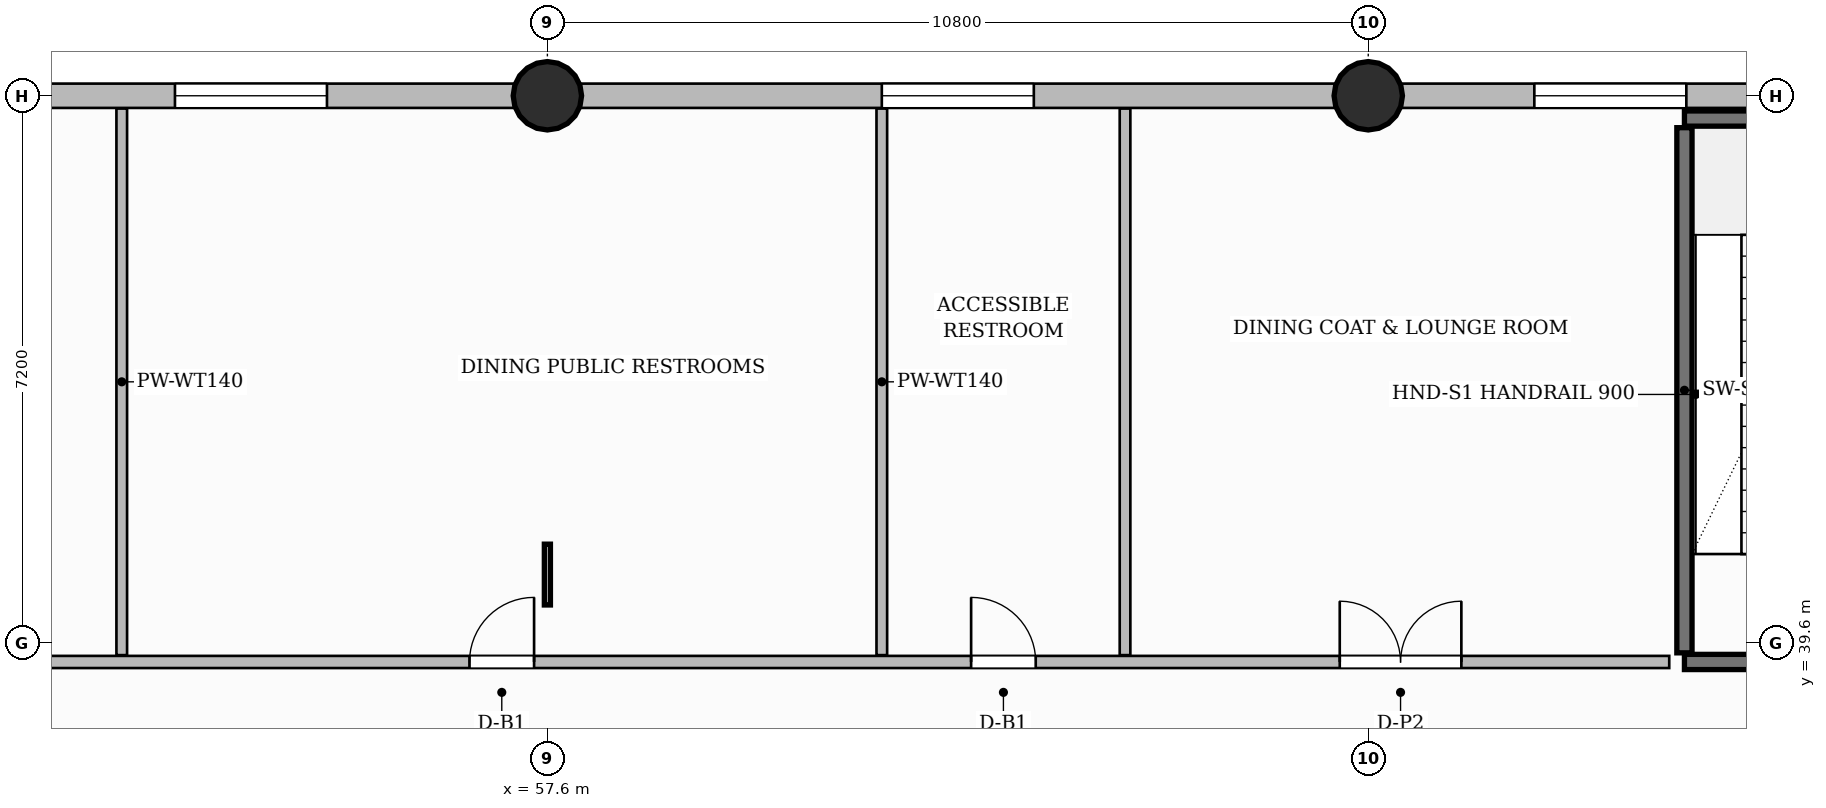
"""IFC4 building model, lengths in metres.
Left out: names, types, materials, properties, quantities, classifications, styles, units other than length and angle.
Written with IfcOpenShell. Run it as: python <this file> out.ifc"""

import sys

from ifc_helpers import new_model, si_unit, direction, frame, frame_2d, origin, origin_2d, place, context, subcontext, project, spatial, rectangle, circle, extrude, source, transform, mapped, element, fill, save


model = new_model("IFC4")
c1 = context("Model", 3, precision=1e-05, world=origin(), true_north=direction((0.0, 1.0)))
c2 = subcontext(c1, "Body", "Model", "MODEL_VIEW")
j1 = project(units=[si_unit("LENGTHUNIT", "METRE"), si_unit("PLANEANGLEUNIT", "RADIAN")], contexts=[c1])
p1 = place(None, origin())
s1 = spatial("IfcSite", under=j1, at=p1, CompositionType="ELEMENT")
p2 = place(p1, origin())
s2 = spatial("IfcBuilding", under=s1, at=p2, CompositionType="ELEMENT")
p3 = place(p2, frame((0.0, 0.0, 10.8)))
s3 = spatial("IfcBuildingStorey", under=s2, at=p3, CompositionType="ELEMENT", Elevation=10.8)
m1 = source(origin(), c2, "Body", "SweptSolid", [
    extrude(circle(Radius=0.45, at=origin_2d()), origin(), (0.0, 0.0, 1.0), 5.4),
])
for number, where, z_axis, x_axis in (
    (1, (57.6, 46.8, 0.0), (0.0, 0.0, 1.0), (1.0, 0.0, 0.0)),
    (2, (68.4, 46.8, 0.0), (0.0, 0.0, 1.0), (1.0, 0.0, 0.0)),
):
    element("IfcColumn", number, at=place(p3, frame(where, z_axis=z_axis, x_axis=x_axis)), inside=s3, PredefinedType="COLUMN", context=c2, shape_type="MappedRepresentation", body=[
        mapped(m1, transform((0.0, 0.0, 0.0), scale=1.0)),
    ])
p4 = place(p3, frame((72.56, 39.47, 0.0), z_axis=(0.0, 0.0, 1.0), x_axis=(0.0, 1.0, 0.0)))
e3 = element("IfcWall", 3, at=p4, inside=s3, PredefinedType="SHEAR", context=c2, shape_type="SweptSolid", body=[
    extrude(rectangle(XDim=6.91, YDim=0.2, at=frame_2d((3.455, 0.0))), origin(), (0.0, 0.0, 1.0), 5.4),
])
p5 = place(p3, frame((72.56, 46.5, 0.0), z_axis=(0.0, 0.0, 1.0), x_axis=(1.0, 0.0, 0.0)))
e4 = element("IfcWall", 4, at=p5, inside=s3, PredefinedType="SHEAR", context=c2, shape_type="SweptSolid", body=[
    extrude(rectangle(XDim=2.94, YDim=0.2, at=frame_2d((1.47, 0.0))), origin(), (0.0, 0.0, 1.0), 5.4),
])
p6 = place(p3, frame((72.56, 39.35, 0.0), z_axis=(0.0, 0.0, 1.0), x_axis=(1.0, 0.0, 0.0)))
e5 = element("IfcWall", 5, at=p6, inside=s3, PredefinedType="SHEAR", context=c2, shape_type="SweptSolid", body=[
    extrude(rectangle(XDim=2.94, YDim=0.2, at=frame_2d((1.47, 0.0))), origin(), (0.0, 0.0, 1.0), 5.4),
])
p7 = place(p6, frame((0.985, 0.0, 0.0)))
e6 = element("IfcOpeningElement", 6, at=p7, cuts=e5, PredefinedType="OPENING", context=c2, shape_type="SweptSolid", body=[
    extrude(rectangle(XDim=1.05, YDim=2.2, at=frame_2d((0.525, 1.1))), frame((0.0, 0.11, 0.0), z_axis=(0.0, -1.0, 0.0), x_axis=(1.0, 0.0, 0.0)), (0.0, 0.0, 1.0), 0.22),
])
p8 = place(p3, frame((28.64, 39.35, 0.0), z_axis=(0.0, 0.0, 1.0), x_axis=(1.0, 0.0, 0.0)))
e7 = element("IfcWall", 7, at=p8, inside=s3, PredefinedType="PARTITIONING", context=c2, shape_type="SweptSolid", body=[
    extrude(rectangle(XDim=43.72, YDim=0.16, at=frame_2d((21.86, 0.0))), origin(), (0.0, 0.0, 1.0), 4.185),
])
p9 = place(p8, frame((10.835, 0.0, 0.0)))
e8 = element("IfcOpeningElement", 8, at=p9, cuts=e7, PredefinedType="OPENING", context=c2, shape_type="SweptSolid", body=[
    extrude(rectangle(XDim=1.6, YDim=2.4, at=frame_2d((0.8, 1.2))), frame((0.0, 0.09, 0.0), z_axis=(0.0, -1.0, 0.0), x_axis=(1.0, 0.0, 0.0)), (0.0, 0.0, 1.0), 0.18),
])
p10 = place(p8, frame((27.935, 0.0, 0.0)))
e9 = element("IfcOpeningElement", 9, at=p10, cuts=e7, PredefinedType="OPENING", context=c2, shape_type="SweptSolid", body=[
    extrude(rectangle(XDim=0.85, YDim=2.1, at=frame_2d((0.425, 1.05))), frame((0.0, 0.09, 0.0), z_axis=(0.0, -1.0, 0.0), x_axis=(1.0, 0.0, 0.0)), (0.0, 0.0, 1.0), 0.18),
])
p11 = place(p8, frame((34.535, 0.0, 0.0)))
e10 = element("IfcOpeningElement", 10, at=p11, cuts=e7, PredefinedType="OPENING", context=c2, shape_type="SweptSolid", body=[
    extrude(rectangle(XDim=0.85, YDim=2.1, at=frame_2d((0.425, 1.05))), frame((0.0, 0.09, 0.0), z_axis=(0.0, -1.0, 0.0), x_axis=(1.0, 0.0, 0.0)), (0.0, 0.0, 1.0), 0.18),
])
p12 = place(p8, frame((39.385, 0.0, 0.0)))
e11 = element("IfcOpeningElement", 11, at=p12, cuts=e7, PredefinedType="OPENING", context=c2, shape_type="SweptSolid", body=[
    extrude(rectangle(XDim=1.6, YDim=2.4, at=frame_2d((0.8, 1.2))), frame((0.0, 0.09, 0.0), z_axis=(0.0, -1.0, 0.0), x_axis=(1.0, 0.0, 0.0)), (0.0, 0.0, 1.0), 0.18),
])
for number, where, z_axis, x_axis in (
    (12, (52.0, 39.44, 0.0), (0.0, 0.0, 1.0), (0.0, 1.0, 0.0)),
    (13, (62.0, 39.44, 0.0), (0.0, 0.0, 1.0), (0.0, 1.0, 0.0)),
    (14, (65.2, 39.44, 0.0), (0.0, 0.0, 1.0), (0.0, 1.0, 0.0)),
):
    element("IfcWall", number, at=place(p3, frame(where, z_axis=z_axis, x_axis=x_axis)), inside=s3, PredefinedType="PARTITIONING", context=c2, shape_type="SweptSolid", body=[
        extrude(rectangle(XDim=7.192, YDim=0.14, at=frame_2d((3.596, 0.0))), origin(), (0.0, 0.0, 1.0), 5.1),
    ])
p13 = place(p3, frame((49.8, 46.8, 0.0), z_axis=(0.0, 0.0, 1.0), x_axis=(1.0, 0.0, 0.0)))
e15 = element("IfcWall", 15, at=p13, inside=s3, PredefinedType="SOLIDWALL", context=c2, shape_type="SweptSolid", body=[
    extrude(rectangle(XDim=30.6, YDim=0.32, at=frame_2d((15.3, 0.0))), origin(), (0.0, 0.0, 1.0), 4.185),
])
p14 = place(p13, frame((2.9, 0.0, 0.75)))
e16 = element("IfcOpeningElement", 16, at=p14, cuts=e15, PredefinedType="OPENING", context=c2, shape_type="SweptSolid", body=[
    extrude(rectangle(XDim=2.0, YDim=2.6, at=frame_2d((1.0, 1.3))), frame((0.0, 0.17, 0.0), z_axis=(0.0, -1.0, 0.0), x_axis=(1.0, 0.0, 0.0)), (0.0, 0.0, 1.0), 0.34),
])
p15 = place(p13, frame((12.2, 0.0, 0.75)))
e17 = element("IfcOpeningElement", 17, at=p15, cuts=e15, PredefinedType="OPENING", context=c2, shape_type="SweptSolid", body=[
    extrude(rectangle(XDim=2.0, YDim=2.6, at=frame_2d((1.0, 1.3))), frame((0.0, 0.17, 0.0), z_axis=(0.0, -1.0, 0.0), x_axis=(1.0, 0.0, 0.0)), (0.0, 0.0, 1.0), 0.34),
])
p16 = place(p13, frame((20.785, 0.0, 0.75)))
e18 = element("IfcOpeningElement", 18, at=p16, cuts=e15, PredefinedType="OPENING", context=c2, shape_type="SweptSolid", body=[
    extrude(rectangle(XDim=2.0, YDim=2.6, at=frame_2d((1.0, 1.3))), frame((0.0, 0.17, 0.0), z_axis=(0.0, -1.0, 0.0), x_axis=(1.0, 0.0, 0.0)), (0.0, 0.0, 1.0), 0.34),
])
p17 = place(p13, frame((25.445, 0.0, 0.75)))
e19 = element("IfcOpeningElement", 19, at=p17, cuts=e15, PredefinedType="OPENING", context=c2, shape_type="SweptSolid", body=[
    extrude(rectangle(XDim=2.0, YDim=2.6, at=frame_2d((1.0, 1.3))), frame((0.0, 0.17, 0.0), z_axis=(0.0, -1.0, 0.0), x_axis=(1.0, 0.0, 0.0)), (0.0, 0.0, 1.0), 0.34),
])
m2 = source(origin(), c2, "Body", "SweptSolid", [
    extrude(rectangle(XDim=0.85, YDim=2.1, at=frame_2d((0.425, 1.05))), frame((0.0, 0.025, 0.0), z_axis=(0.0, -1.0, 0.0), x_axis=(1.0, 0.0, 0.0)), (0.0, 0.0, 1.0), 0.05),
])
p18 = place(p10, origin())
e20 = element("IfcDoor", 20, at=p18, inside=s3, OperationType="SINGLE_SWING_RIGHT", PredefinedType="DOOR", context=c2, shape_type="MappedRepresentation", body=[
    mapped(m2, transform((0.0, 0.0, 0.0), scale=1.0)),
])
fill(e9, e20)
p19 = place(p11, origin())
e21 = element("IfcDoor", 21, at=p19, inside=s3, OperationType="SINGLE_SWING_LEFT", PredefinedType="DOOR", context=c2, shape_type="MappedRepresentation", body=[
    mapped(m2, transform((0.0, 0.0, 0.0), scale=1.0)),
])
fill(e10, e21)
m3 = source(origin(), c2, "Body", "SweptSolid", [
    extrude(rectangle(XDim=1.6, YDim=2.4, at=frame_2d((0.8, 1.2))), frame((0.0, 0.025, 0.0), z_axis=(0.0, -1.0, 0.0), x_axis=(1.0, 0.0, 0.0)), (0.0, 0.0, 1.0), 0.05),
])
p20 = place(p12, origin())
e22 = element("IfcDoor", 22, at=p20, inside=s3, OperationType="DOUBLE_DOOR_SINGLE_SWING", PredefinedType="DOOR", context=c2, shape_type="MappedRepresentation", body=[
    mapped(m3, transform((0.0, 0.0, 0.0), scale=1.0)),
])
fill(e11, e22)
m4 = source(origin(), c2, "Body", "SweptSolid", [
    extrude(rectangle(XDim=2.0, YDim=2.6, at=frame_2d((1.0, 1.3))), frame((0.0, 0.03, 0.0), z_axis=(0.0, -1.0, 0.0), x_axis=(1.0, 0.0, 0.0)), (0.0, 0.0, 1.0), 0.06),
])
p21 = place(p14, origin())
e23 = element("IfcWindow", 23, at=p21, inside=s3, PartitioningType="DOUBLE_PANEL_VERTICAL", PredefinedType="WINDOW", context=c2, shape_type="MappedRepresentation", body=[
    mapped(m4, transform((0.0, 0.0, 0.0), scale=1.0)),
])
fill(e16, e23)
p22 = place(p15, origin())
e24 = element("IfcWindow", 24, at=p22, inside=s3, PartitioningType="DOUBLE_PANEL_VERTICAL", PredefinedType="WINDOW", context=c2, shape_type="MappedRepresentation", body=[
    mapped(m4, transform((0.0, 0.0, 0.0), scale=1.0)),
])
fill(e17, e24)
p23 = place(p16, origin())
e25 = element("IfcWindow", 25, at=p23, inside=s3, PartitioningType="DOUBLE_PANEL_VERTICAL", PredefinedType="WINDOW", context=c2, shape_type="MappedRepresentation", body=[
    mapped(m4, transform((0.0, 0.0, 0.0), scale=1.0)),
])
fill(e18, e25)
save(model, sys.argv[1])
